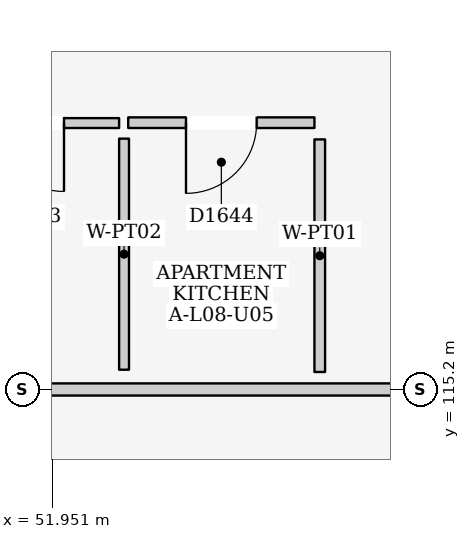
"""IFC4 building model, lengths in metres.
Left out: names, types, materials, properties, quantities, classifications, styles, units other than length and angle.
Written with IfcOpenShell. Run it as: python <this file> out.ifc"""

import sys

from ifc_helpers import new_model, si_unit, direction, frame, frame_2d, origin, place, context, subcontext, project, spatial, rectangle, extrude, element, fill, save


model = new_model("IFC4")
c1 = context("Model", 3, precision=1e-05, world=origin(), true_north=direction((0.0, 1.0)))
c2 = subcontext(c1, "Body", "Model", "MODEL_VIEW")
j1 = project(units=[si_unit("LENGTHUNIT", "METRE"), si_unit("PLANEANGLEUNIT", "RADIAN")], contexts=[c1])
p1 = place(None, origin())
s1 = spatial("IfcSite", under=j1, at=p1, CompositionType="ELEMENT")
p2 = place(p1, origin())
s2 = spatial("IfcBuilding", under=s1, at=p2, CompositionType="ELEMENT")
p3 = place(p2, frame((0.0, 0.0, 28.3)))
s3 = spatial("IfcBuildingStorey", under=s2, at=p3, CompositionType="ELEMENT", Elevation=28.3)
p4 = place(p3, frame((50.73, 115.2, 0.0), z_axis=(0.0, 0.0, 1.0), x_axis=(1.0, 0.0, 0.0)))
e1 = element("IfcWall", 1, at=p4, inside=s3, PredefinedType="PARTITIONING", context=c2, shape_type="SweptSolid", body=[
    extrude(rectangle(XDim=6.54, YDim=0.16, at=frame_2d((3.27, 0.0))), origin(), (0.0, 0.0, 1.0), 2.285),
])
p5 = place(p3, frame((50.48, 118.705, 0.0), z_axis=(0.0, 0.0, 1.0), x_axis=(1.0, 0.0, 0.0)))
e2 = element("IfcWall", 2, at=p5, inside=s3, PredefinedType="PARTITIONING", context=c2, shape_type="SweptSolid", body=[
    extrude(rectangle(XDim=2.35, YDim=0.13, at=frame_2d((1.175, 0.0))), origin(), (0.0, 0.0, 1.0), 2.95),
])
p6 = place(p5, frame((0.725, 0.0, 0.0)))
e3 = element("IfcOpeningElement", 3, at=p6, cuts=e2, PredefinedType="OPENING", context=c2, shape_type="SweptSolid", body=[
    extrude(rectangle(XDim=0.9, YDim=2.1, at=frame_2d((0.45, 1.05))), frame((0.0, 0.08, 0.0), z_axis=(0.0, -1.0, 0.0), x_axis=(1.0, 0.0, 0.0)), (0.0, 0.0, 1.0), 0.16),
])
p7 = place(p3, frame((52.895, 115.46, 0.0), z_axis=(0.0, 0.0, 1.0), x_axis=(0.0, 1.0, 0.0)))
e4 = element("IfcWall", 4, at=p7, inside=s3, PredefinedType="PARTITIONING", context=c2, shape_type="SweptSolid", body=[
    extrude(rectangle(XDim=3.04, YDim=0.13, at=frame_2d((1.52, 0.0))), origin(), (0.0, 0.0, 1.0), 2.95),
])
p8 = place(p3, frame((52.95, 118.71, 0.0), z_axis=(0.0, 0.0, 1.0), x_axis=(1.0, 0.0, 0.0)))
e5 = element("IfcWall", 5, at=p8, inside=s3, PredefinedType="PARTITIONING", context=c2, shape_type="SweptSolid", body=[
    extrude(rectangle(XDim=2.45, YDim=0.14, at=frame_2d((1.225, 0.0))), origin(), (0.0, 0.0, 1.0), 2.95),
])
p9 = place(p8, frame((0.76, 0.0, 0.0)))
e6 = element("IfcOpeningElement", 6, at=p9, cuts=e5, PredefinedType="OPENING", context=c2, shape_type="SweptSolid", body=[
    extrude(rectangle(XDim=0.93, YDim=2.14, at=frame_2d((0.465, 1.07))), frame((0.0, 0.085, 0.0), z_axis=(0.0, -1.0, 0.0), x_axis=(1.0, 0.0, 0.0)), (0.0, 0.0, 1.0), 0.17),
])
p10 = place(p3, frame((55.47, 115.43, 0.0), z_axis=(0.0, 0.0, 1.0), x_axis=(0.0, 1.0, 0.0)))
e7 = element("IfcWall", 7, at=p10, inside=s3, PredefinedType="PARTITIONING", context=c2, shape_type="SweptSolid", body=[
    extrude(rectangle(XDim=3.06, YDim=0.14, at=frame_2d((1.53, 0.0))), origin(), (0.0, 0.0, 1.0), 2.95),
])
p11 = place(p6, frame((0.9, 0.0, 0.0), z_axis=(0.0, 0.0, 1.0), x_axis=(-1.0, 0.0, 0.0)))
e8 = element("IfcDoor", 8, at=p11, inside=s3, OperationType="SINGLE_SWING_LEFT", PredefinedType="DOOR", context=c2, shape_type="SweptSolid", body=[
    extrude(rectangle(XDim=0.9, YDim=2.1, at=frame_2d((0.45, 1.05))), frame((0.0, 0.025, 0.0), z_axis=(0.0, -1.0, 0.0), x_axis=(1.0, 0.0, 0.0)), (0.0, 0.0, 1.0), 0.05),
])
fill(e3, e8)
p12 = place(p9, frame((0.93, 0.0, 0.0), z_axis=(0.0, 0.0, 1.0), x_axis=(-1.0, 0.0, 0.0)))
e9 = element("IfcDoor", 9, at=p12, inside=s3, OperationType="SINGLE_SWING_RIGHT", PredefinedType="DOOR", context=c2, shape_type="SweptSolid", body=[
    extrude(rectangle(XDim=0.93, YDim=2.14, at=frame_2d((0.465, 1.07))), frame((0.0, 0.025, 0.0), z_axis=(0.0, -1.0, 0.0), x_axis=(1.0, 0.0, 0.0)), (0.0, 0.0, 1.0), 0.05),
])
fill(e6, e9)
save(model, sys.argv[1])
